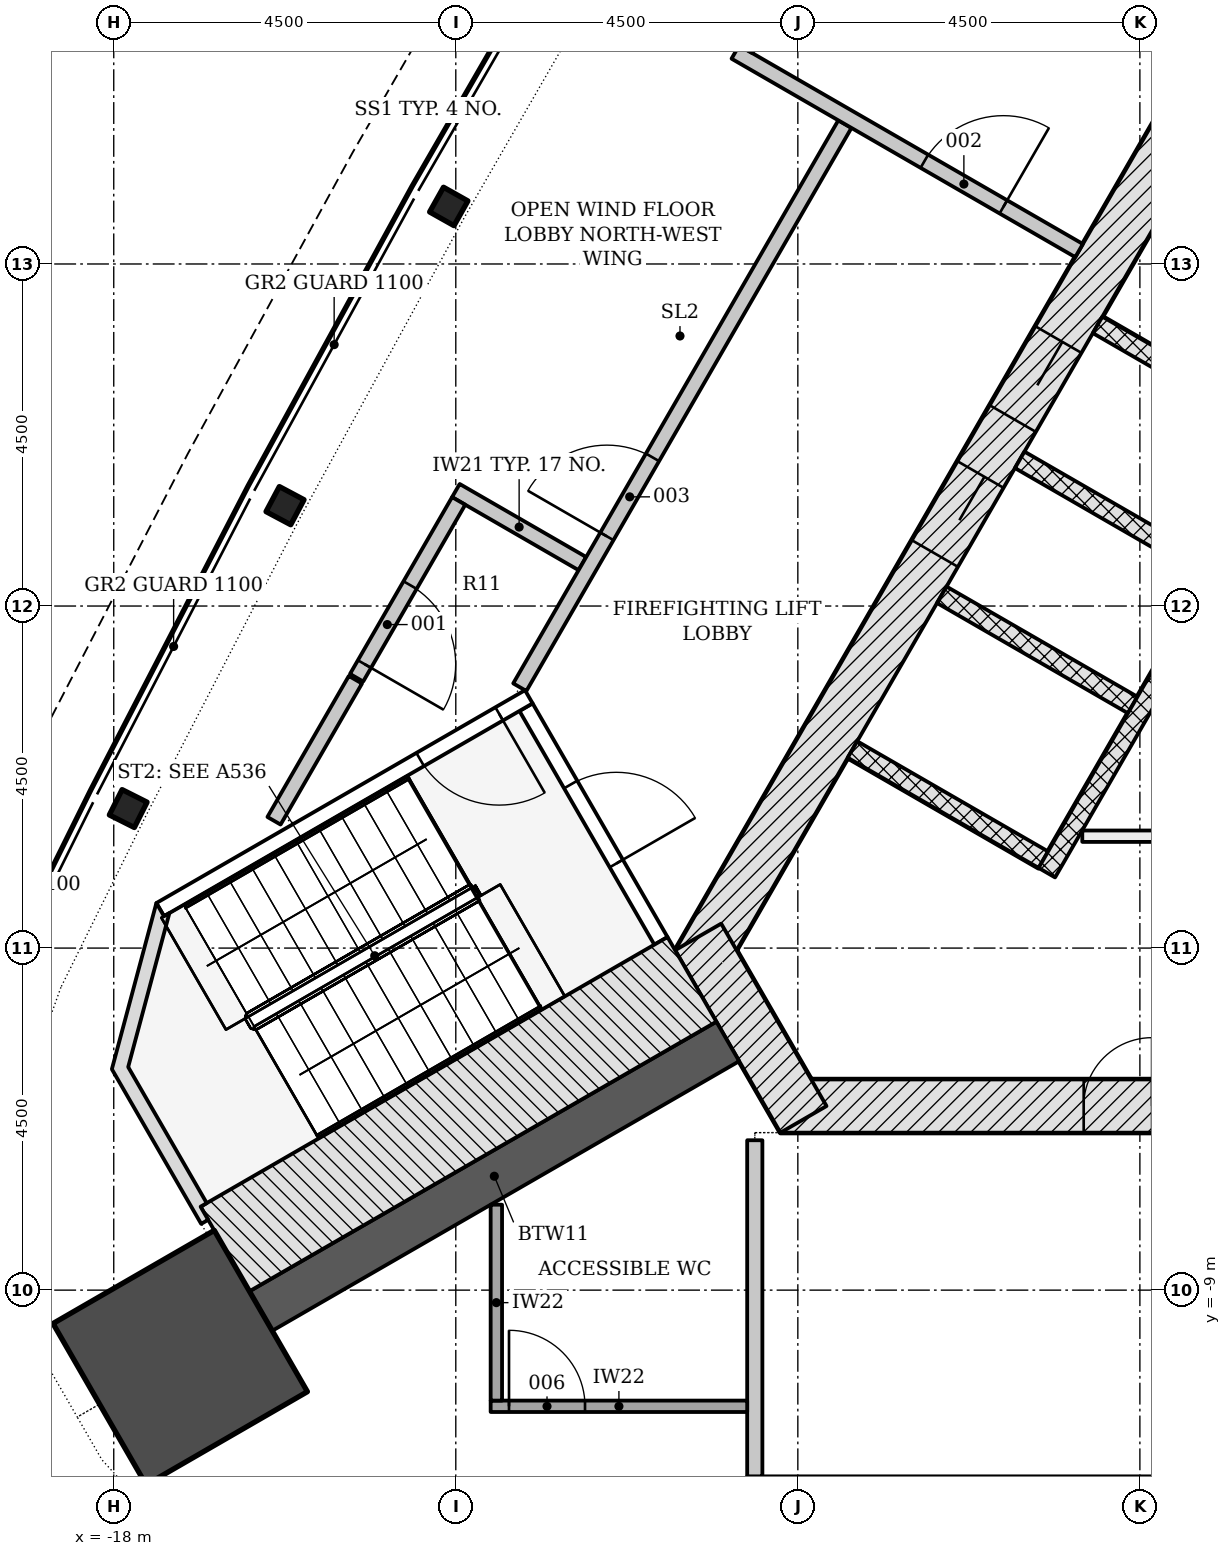
"""IFC4 building model, lengths in metres.
Left out: names, types, materials, properties, quantities, classifications, styles, units other than length and angle.
Written with IfcOpenShell. Run it as: python <this file> out.ifc"""

import sys

from ifc_helpers import new_model, si_unit, direction, frame, frame_2d, origin, origin_2d, place, context, subcontext, project, spatial, polyline, rectangle, i_section, outline, extrude, element, fill, save


model = new_model("IFC4")
c1 = context("Model", 3, precision=1e-05, world=origin(), true_north=direction((0.0, 1.0)))
c2 = subcontext(c1, "Body", "Model", "MODEL_VIEW")
j1 = project(units=[si_unit("LENGTHUNIT", "METRE"), si_unit("PLANEANGLEUNIT", "RADIAN")], contexts=[c1])
p1 = place(None, origin())
s1 = spatial("IfcSite", under=j1, at=p1, CompositionType="ELEMENT")
p2 = place(p1, origin())
s2 = spatial("IfcBuilding", under=s1, at=p2, CompositionType="ELEMENT")
p3 = place(p2, frame((0.0, 0.0, 250.8)))
s3 = spatial("IfcBuildingStorey", under=s2, at=p3, CompositionType="ELEMENT", Elevation=250.8)
p4 = place(p3, frame((-9.229, -6.578, -0.3), z_axis=(0.0, 0.0, 1.0), x_axis=(1.0, 0.0, 0.0)))
e1 = element("IfcWall", 1, at=p4, inside=s3, PredefinedType="SHEAR", context=c2, shape_type="SweptSolid", body=[
    extrude(rectangle(XDim=18.458, YDim=0.7, at=frame_2d((9.229, 0.0))), origin(), (0.0, 0.0, 1.0), 7.2),
])
p5 = place(p4, frame((8.7, 0.0, 0.3)))
e2 = element("IfcOpeningElement", 2, at=p5, cuts=e1, PredefinedType="OPENING", context=c2, shape_type="SweptSolid", body=[
    extrude(rectangle(XDim=1.0, YDim=2.1, at=frame_2d((0.5, 1.05))), frame((0.0, 0.36, 0.0), z_axis=(0.0, -1.0, 0.0), x_axis=(1.0, 0.0, 0.0)), (0.0, 0.0, 1.0), 0.72),
])
p6 = place(p4, frame((3.99, 0.0, 0.3)))
e3 = element("IfcOpeningElement", 3, at=p6, cuts=e1, PredefinedType="OPENING", context=c2, shape_type="SweptSolid", body=[
    extrude(rectangle(XDim=0.9, YDim=2.1, at=frame_2d((0.45, 1.05))), frame((0.0, 0.36, 0.0), z_axis=(0.0, -1.0, 0.0), x_axis=(1.0, 0.0, 0.0)), (0.0, 0.0, 1.0), 0.72),
])
p7 = place(p4, frame((13.539, 0.0, 0.3)))
e4 = element("IfcOpeningElement", 4, at=p7, cuts=e1, PredefinedType="OPENING", context=c2, shape_type="SweptSolid", body=[
    extrude(rectangle(XDim=0.9, YDim=2.1, at=frame_2d((0.45, 1.05))), frame((0.0, 0.36, 0.0), z_axis=(0.0, -1.0, 0.0), x_axis=(1.0, 0.0, 0.0)), (0.0, 0.0, 1.0), 0.72),
])
p8 = place(p3, frame((-1.083, 11.281, -0.3), z_axis=(0.0, 0.0, 1.0), x_axis=(-0.500001446645, -0.866024568562, 0.0)))
e5 = element("IfcWall", 5, at=p8, inside=s3, PredefinedType="SHEAR", context=c2, shape_type="SweptSolid", body=[
    extrude(rectangle(XDim=18.458, YDim=0.7, at=frame_2d((9.229, 0.0))), origin(), (0.0, 0.0, 1.0), 7.2),
])
p9 = place(p8, frame((8.979, 0.0, 0.3)))
e6 = element("IfcOpeningElement", 6, at=p9, cuts=e5, PredefinedType="OPENING", context=c2, shape_type="SweptSolid", body=[
    extrude(rectangle(XDim=1.2, YDim=2.1, at=frame_2d((0.6, 1.05))), frame((0.0, 0.36, 0.0), z_axis=(0.0, -1.0, 0.0), x_axis=(1.0, 0.0, 0.0)), (0.0, 0.0, 1.0), 0.72),
])
p10 = place(p8, frame((11.029, 0.0, 0.3)))
e7 = element("IfcOpeningElement", 7, at=p10, cuts=e5, PredefinedType="OPENING", context=c2, shape_type="SweptSolid", body=[
    extrude(rectangle(XDim=1.2, YDim=2.1, at=frame_2d((0.6, 1.05))), frame((0.0, 0.36, 0.0), z_axis=(0.0, -1.0, 0.0), x_axis=(1.0, 0.0, 0.0)), (0.0, 0.0, 1.0), 0.72),
])
p11 = place(p3, frame((-10.311, -4.353, -0.3), z_axis=(0.0, 0.0, 1.0), x_axis=(0.500042739161, -0.866000726912, 0.0)))
e8 = element("IfcWall", 8, at=p11, inside=s3, PredefinedType="SHEAR", context=c2, shape_type="SweptSolid", body=[
    extrude(rectangle(XDim=2.771, YDim=0.7, at=frame_2d((1.386, 0.0))), origin(), (0.0, 0.0, 1.0), 7.2),
])
p12 = place(p3, frame((-9.922, -5.728, -0.3), z_axis=(0.0, 0.0, 1.0), x_axis=(-0.866029688112, -0.499992579254, 0.0)))
e9 = element("IfcWall", 9, at=p12, inside=s3, PredefinedType="SHEAR", context=c2, shape_type="SweptSolid", body=[
    extrude(rectangle(XDim=7.093, YDim=0.6, at=frame_2d((3.547, 0.0))), origin(), (0.0, 0.0, 1.0), 7.2),
])
p13 = place(p3, frame((-17.126, -9.887, -0.3), z_axis=(0.0, 0.0, 1.0), x_axis=(-0.866025403784, -0.5, 0.0)))
e10 = element("IfcColumn", 10, at=p13, inside=s3, PredefinedType="COLUMN", context=c2, shape_type="SweptSolid", body=[
    extrude(rectangle(XDim=2.45, YDim=2.45, at=origin_2d()), origin(), (0.0, 0.0, 1.0), 7.2),
])
for number, where, z_axis, x_axis in (
    (11, (-13.593, 5.257, -0.3), (0.0, 0.0, 1.0), (-0.49, -0.872, 0.0)),
    (12, (-15.747, 1.32, -0.3), (0.0, 0.0, 1.0), (-0.47, -0.883, 0.0)),
    (13, (-17.81, -2.665, -0.3), (0.0, 0.0, 1.0), (-0.45, -0.893, 0.0)),
):
    element("IfcColumn", number, at=place(p3, frame(where, z_axis=z_axis, x_axis=x_axis)), inside=s3, PredefinedType="COLUMN", context=c2, shape_type="SweptSolid", body=[
        extrude(i_section(OverallWidth=0.373, OverallDepth=0.368, WebThickness=0.015, FlangeThickness=0.024, FilletRadius=0.015, at=origin_2d()), origin(), (0.0, 0.0, 1.0), 7.2),
    ])
for number, where, z_axis, x_axis in (
    (14, (-5.056, 3.699, -0.3), (0.0, 0.0, 1.0), (0.866, -0.5, 0.0)),
    (15, (-6.081, 1.923, -0.3), (0.0, 0.0, 1.0), (0.866, -0.5, 0.0)),
    (16, (-7.106, 0.148, -0.3), (0.0, 0.0, 1.0), (0.866, -0.5, 0.0)),
    (17, (-8.281, -1.887, -0.3), (0.0, 0.0, 1.0), (0.866, -0.5, 0.0)),
):
    element("IfcWall", number, at=place(p3, frame(where, z_axis=z_axis, x_axis=x_axis)), inside=s3, PredefinedType="PARTITIONING", context=c2, shape_type="SweptSolid", body=[
        extrude(rectangle(XDim=2.9, YDim=0.25, at=frame_2d((1.45, 0.0))), origin(), (0.0, 0.0, 1.0), 7.2),
    ])
p14 = place(p3, frame((-2.374, 2.294, 0.0), z_axis=(0.0, 0.0, 1.0), x_axis=(-0.500003174267, -0.866023571113, 0.0)))
e18 = element("IfcWall", 18, at=p14, inside=s3, PredefinedType="PARTITIONING", context=c2, shape_type="SweptSolid", body=[
    extrude(rectangle(XDim=6.7, YDim=0.25, at=frame_2d((3.35, 0.0))), origin(), (0.0, 0.0, 1.0), 6.9),
])
p15 = place(p3, frame((-5.258, -3.028, 0.0), z_axis=(0.0, 0.0, 1.0), x_axis=(1.0, 0.0, 0.0)))
e19 = element("IfcWall", 19, at=p15, inside=s3, PredefinedType="PARTITIONING", context=c2, shape_type="SweptSolid", body=[
    extrude(rectangle(XDim=4.429, YDim=0.15, at=frame_2d((2.215, 0.0))), origin(), (0.0, 0.0, 1.0), 6.9),
])
p16 = place(p3, frame((-12.576, -1.331, -0.3), z_axis=(0.0, 0.0, 1.0), x_axis=(0.499970499736, -0.8660424351, 0.0)))
e20 = element("IfcWall", 20, at=p16, inside=s3, PredefinedType="SHEAR", context=c2, shape_type="SweptSolid", body=[
    extrude(rectangle(XDim=3.55, YDim=0.2, at=frame_2d((1.775, 0.0))), origin(), (0.0, 0.0, 1.0), 7.2),
])
p17 = place(p16, frame((1.175, 0.0, 0.3)))
e21 = element("IfcOpeningElement", 21, at=p17, cuts=e20, PredefinedType="OPENING", context=c2, shape_type="SweptSolid", body=[
    extrude(rectangle(XDim=1.2, YDim=2.1, at=frame_2d((0.6, 1.05))), frame((0.0, 0.11, 0.0), z_axis=(0.0, -1.0, 0.0), x_axis=(1.0, 0.0, 0.0)), (0.0, 0.0, 1.0), 0.22),
])
p18 = place(p3, frame((-12.539, -1.194, -0.3), z_axis=(0.0, 0.0, 1.0), x_axis=(-0.866045472092, -0.499965239061, 0.0)))
e22 = element("IfcWall", 22, at=p18, inside=s3, PredefinedType="SHEAR", context=c2, shape_type="SweptSolid", body=[
    extrude(rectangle(XDim=5.6, YDim=0.2, at=frame_2d((2.8, 0.0))), origin(), (0.0, 0.0, 1.0), 7.2),
])
p19 = place(p18, frame((0.45, 0.0, 0.3)))
e23 = element("IfcOpeningElement", 23, at=p19, cuts=e22, PredefinedType="OPENING", context=c2, shape_type="SweptSolid", body=[
    extrude(rectangle(XDim=1.2, YDim=2.1, at=frame_2d((0.6, 1.05))), frame((0.0, 0.11, 0.0), z_axis=(0.0, -1.0, 0.0), x_axis=(1.0, 0.0, 0.0)), (0.0, 0.0, 1.0), 0.22),
])
p20 = place(p3, frame((-10.393, -4.912, -0.3), z_axis=(0.0, 0.0, 1.0), x_axis=(-0.866023389271, -0.500003489223, 0.0)))
e24 = element("IfcWall", 24, at=p20, inside=s3, PredefinedType="SHEAR", context=c2, shape_type="SweptSolid", body=[
    extrude(rectangle(XDim=7.094, YDim=1.286, at=frame_2d((3.547, 0.0))), origin(), (0.0, 0.0, 1.0), 7.2),
])
p21 = place(p3, frame((0.0, 0.0, -0.3)))
e25 = element("IfcWall", 25, at=p21, inside=s3, PredefinedType="SHEAR", context=c2, shape_type="SweptSolid", body=[
    extrude(outline(polyline([(-17.439, -3.907), (-18.025, -6.093), (-16.85, -8.128), (-16.758, -8.075), (-16.858, -7.902), (-16.858, -7.902), (-16.858, -7.902), (-16.858, -7.902), (-16.858, -7.902), (-16.858, -7.902), (-16.858, -7.902), (-16.858, -7.902), (-16.858, -7.902), (-16.858, -7.902), (-16.858, -7.902), (-16.858, -7.902), (-16.858, -7.902), (-16.858, -7.902), (-16.858, -7.902), (-16.858, -7.902), (-16.858, -7.902), (-16.777, -7.855), (-17.81, -6.065), (-17.267, -4.039), (-17.339, -4.081), (-17.339, -4.081), (-17.339, -4.081), (-17.339, -4.081), (-17.339, -4.081), (-17.339, -4.081), (-17.339, -4.081), (-17.339, -4.081), (-17.339, -4.081), (-17.339, -4.081), (-17.339, -4.081), (-17.339, -4.081), (-17.339, -4.081), (-17.339, -4.081), (-17.339, -4.081), (-17.339, -4.081), (-17.339, -4.081), (-17.439, -3.907)])), origin(), (0.0, 0.0, 1.0), 7.2),
])
p22 = place(p3, frame((-13.499, 1.519, 0.0), z_axis=(0.0, 0.0, 1.0), x_axis=(0.866014224953, -0.500019361804, 0.0)))
e26 = element("IfcWall", 26, at=p22, inside=s3, PredefinedType="PARTITIONING", context=c2, shape_type="SweptSolid", body=[
    extrude(rectangle(XDim=1.922, YDim=0.2, at=frame_2d((0.961, 0.0))), origin(), (0.0, 0.0, 1.0), 6.9),
])
p23 = place(p3, frame((-12.658, -1.068, 0.0), z_axis=(0.0, 0.0, 1.0), x_axis=(0.500000816281, 0.866024932504, 0.0)))
e27 = element("IfcWall", 27, at=p23, inside=s3, PredefinedType="PARTITIONING", context=c2, shape_type="SweptSolid", body=[
    extrude(rectangle(XDim=8.554, YDim=0.2, at=frame_2d((4.277, 0.0))), origin(), (0.0, 0.0, 1.0), 6.352),
])
p24 = place(p23, frame((2.292, 0.0, 0.0)))
e28 = element("IfcOpeningElement", 28, at=p24, cuts=e27, PredefinedType="OPENING", context=c2, shape_type="SweptSolid", body=[
    extrude(rectangle(XDim=1.2, YDim=2.1, at=frame_2d((0.6, 1.05))), frame((0.0, 0.11, 0.0), z_axis=(0.0, -1.0, 0.0), x_axis=(1.0, 0.0, 0.0)), (0.0, 0.0, 1.0), 0.22),
])
p25 = place(p3, frame((-9.822, 7.287, 0.0), z_axis=(0.0, 0.0, 1.0), x_axis=(0.866030647982, -0.499990916673, 0.0)))
e29 = element("IfcWall", 29, at=p25, inside=s3, PredefinedType="PARTITIONING", context=c2, shape_type="SweptSolid", body=[
    extrude(rectangle(XDim=5.222, YDim=0.2, at=frame_2d((2.611, 0.0))), origin(), (0.0, 0.0, 1.0), 6.9),
])
p26 = place(p25, frame((2.872, 0.0, 0.0)))
e30 = element("IfcOpeningElement", 30, at=p26, cuts=e29, PredefinedType="OPENING", context=c2, shape_type="SweptSolid", body=[
    extrude(rectangle(XDim=1.2, YDim=2.1, at=frame_2d((0.6, 1.05))), frame((0.0, 0.11, 0.0), z_axis=(0.0, -1.0, 0.0), x_axis=(1.0, 0.0, 0.0)), (0.0, 0.0, 1.0), 0.22),
])
p27 = place(p3, frame((-13.462, 1.383, 0.0), z_axis=(0.0, 0.0, 1.0), x_axis=(-0.500000452315, -0.86602514264, 0.0)))
e31 = element("IfcWall", 31, at=p27, inside=s3, PredefinedType="PARTITIONING", context=c2, shape_type="SweptSolid", body=[
    extrude(rectangle(XDim=2.686, YDim=0.2, at=frame_2d((1.343, 0.0))), origin(), (0.0, 0.0, 1.0), 6.352),
])
p28 = place(p27, frame((1.278, 0.0, 0.0)))
e32 = element("IfcOpeningElement", 32, at=p28, cuts=e31, PredefinedType="OPENING", context=c2, shape_type="SweptSolid", body=[
    extrude(rectangle(XDim=1.2, YDim=2.1, at=frame_2d((0.6, 1.05))), frame((0.0, 0.11, 0.0), z_axis=(0.0, -1.0, 0.0), x_axis=(1.0, 0.0, 0.0)), (0.0, 0.0, 1.0), 0.22),
])
p29 = place(p3, frame((-14.821, -0.97, 0.0), z_axis=(0.0, 0.0, 1.0), x_axis=(-0.49992632152, -0.866067937896, 0.0)))
e33 = element("IfcWall", 33, at=p29, inside=s3, PredefinedType="PARTITIONING", context=c2, shape_type="SweptSolid", body=[
    extrude(rectangle(XDim=2.142, YDim=0.2, at=frame_2d((1.071, 0.0))), origin(), (0.0, 0.0, 1.0), 6.9),
])
p30 = place(p3, frame((-3.536, 17.976, 0.0), z_axis=(0.0, 0.0, 1.0), x_axis=(-0.499994497941, -0.866028580376, 0.0)))
e34 = element("IfcWall", 34, at=p30, inside=s3, PredefinedType="PARTITIONING", context=c2, shape_type="SweptSolid", body=[
    extrude(rectangle(XDim=12.3, YDim=0.2, at=frame_2d((6.15, 0.0))), origin(), (0.0, 0.0, 1.0), 6.9),
])
p31 = place(p3, frame((-9.667, -11.55, 0.0), z_axis=(0.0, 0.0, 1.0), x_axis=(1.0, 0.0, 0.0)))
e35 = element("IfcWall", 35, at=p31, inside=s3, PredefinedType="PARTITIONING", context=c2, shape_type="SweptSolid", body=[
    extrude(rectangle(XDim=15.0, YDim=0.2, at=frame_2d((7.5, 0.0))), origin(), (0.0, 0.0, 1.0), 6.352),
])
p32 = place(p3, frame((-9.566, -11.45, 0.0), z_axis=(0.0, 0.0, 1.0), x_axis=(0.0, 1.0, 0.0)))
e36 = element("IfcWall", 36, at=p32, inside=s3, PredefinedType="PARTITIONING", context=c2, shape_type="SweptSolid", body=[
    extrude(rectangle(XDim=4.422, YDim=0.2, at=frame_2d((2.211, 0.0))), origin(), (0.0, 0.0, 1.0), 6.9),
])
p33 = place(p3, frame((-13.042, -10.528, 0.0), z_axis=(0.0, 0.0, 1.0), x_axis=(1.0, 0.0, 0.0)))
e37 = element("IfcWall", 37, at=p33, inside=s3, PredefinedType="PARTITIONING", context=c2, shape_type="SweptSolid", body=[
    extrude(rectangle(XDim=3.375, YDim=0.15, at=frame_2d((1.688, 0.0))), origin(), (0.0, 0.0, 1.0), 6.352),
])
p34 = place(p33, frame((0.241, 0.0, 0.0)))
e38 = element("IfcOpeningElement", 38, at=p34, cuts=e37, PredefinedType="OPENING", context=c2, shape_type="SweptSolid", body=[
    extrude(rectangle(XDim=1.0, YDim=2.1, at=frame_2d((0.5, 1.05))), frame((0.0, 0.085, 0.0), z_axis=(0.0, -1.0, 0.0), x_axis=(1.0, 0.0, 0.0)), (0.0, 0.0, 1.0), 0.17),
])
p35 = place(p3, frame((-12.966, -7.876, 0.0), z_axis=(0.0, 0.0, 1.0), x_axis=(0.0, -1.0, 0.0)))
e39 = element("IfcWall", 39, at=p35, inside=s3, PredefinedType="PARTITIONING", context=c2, shape_type="SweptSolid", body=[
    extrude(rectangle(XDim=2.577, YDim=0.15, at=frame_2d((1.289, 0.0))), origin(), (0.0, 0.0, 1.0), 6.9),
])
p36 = place(p9, origin())
e40 = element("IfcDoor", 40, at=p36, inside=s3, OperationType="DOUBLE_DOOR_SLIDING", PredefinedType="DOOR", context=c2, shape_type="SweptSolid", body=[
    extrude(rectangle(XDim=1.2, YDim=2.1, at=frame_2d((0.6, 1.05))), frame((0.0, 0.025, 0.0), z_axis=(0.0, -1.0, 0.0), x_axis=(1.0, 0.0, 0.0)), (0.0, 0.0, 1.0), 0.05),
])
fill(e6, e40)
p37 = place(p10, origin())
e41 = element("IfcDoor", 41, at=p37, inside=s3, OperationType="DOUBLE_DOOR_SLIDING", PredefinedType="DOOR", context=c2, shape_type="SweptSolid", body=[
    extrude(rectangle(XDim=1.2, YDim=2.1, at=frame_2d((0.6, 1.05))), frame((0.0, 0.025, 0.0), z_axis=(0.0, -1.0, 0.0), x_axis=(1.0, 0.0, 0.0)), (0.0, 0.0, 1.0), 0.05),
])
fill(e7, e41)
p38 = place(p6, origin())
e42 = element("IfcDoor", 42, at=p38, inside=s3, OperationType="SINGLE_SWING_RIGHT", PredefinedType="DOOR", context=c2, shape_type="SweptSolid", body=[
    extrude(rectangle(XDim=0.9, YDim=2.1, at=frame_2d((0.45, 1.05))), frame((0.0, 0.075, 0.0), z_axis=(0.0, -1.0, 0.0), x_axis=(1.0, 0.0, 0.0)), (0.0, 0.0, 1.0), 0.15),
])
fill(e3, e42)
p39 = place(p17, origin())
e43 = element("IfcDoor", 43, at=p39, inside=s3, OperationType="SINGLE_SWING_RIGHT", PredefinedType="DOOR", context=c2, shape_type="SweptSolid", body=[
    extrude(rectangle(XDim=1.2, YDim=2.1, at=frame_2d((0.6, 1.05))), frame((0.0, 0.025, 0.0), z_axis=(0.0, -1.0, 0.0), x_axis=(1.0, 0.0, 0.0)), (0.0, 0.0, 1.0), 0.05),
])
fill(e21, e43)
p40 = place(p19, origin())
e44 = element("IfcDoor", 44, at=p40, inside=s3, OperationType="SINGLE_SWING_LEFT", PredefinedType="DOOR", context=c2, shape_type="SweptSolid", body=[
    extrude(rectangle(XDim=1.2, YDim=2.1, at=frame_2d((0.6, 1.05))), frame((0.0, 0.025, 0.0), z_axis=(0.0, -1.0, 0.0), x_axis=(1.0, 0.0, 0.0)), (0.0, 0.0, 1.0), 0.05),
])
fill(e23, e44)
p41 = place(p28, origin())
e45 = element("IfcDoor", 45, at=p41, inside=s3, OperationType="SINGLE_SWING_RIGHT", PredefinedType="DOOR", context=c2, shape_type="SweptSolid", body=[
    extrude(rectangle(XDim=1.2, YDim=2.1, at=frame_2d((0.6, 1.05))), frame((0.0, 0.025, 0.0), z_axis=(0.0, -1.0, 0.0), x_axis=(1.0, 0.0, 0.0)), (0.0, 0.0, 1.0), 0.05),
])
fill(e32, e45)
p42 = place(p26, origin())
e46 = element("IfcDoor", 46, at=p42, inside=s3, OperationType="SINGLE_SWING_RIGHT", PredefinedType="DOOR", context=c2, shape_type="SweptSolid", body=[
    extrude(rectangle(XDim=1.2, YDim=2.1, at=frame_2d((0.6, 1.05))), frame((0.0, 0.025, 0.0), z_axis=(0.0, -1.0, 0.0), x_axis=(1.0, 0.0, 0.0)), (0.0, 0.0, 1.0), 0.05),
])
fill(e30, e46)
p43 = place(p24, origin())
e47 = element("IfcDoor", 47, at=p43, inside=s3, OperationType="SINGLE_SWING_LEFT", PredefinedType="DOOR", context=c2, shape_type="SweptSolid", body=[
    extrude(rectangle(XDim=1.2, YDim=2.1, at=frame_2d((0.6, 1.05))), frame((0.0, 0.025, 0.0), z_axis=(0.0, -1.0, 0.0), x_axis=(1.0, 0.0, 0.0)), (0.0, 0.0, 1.0), 0.05),
])
fill(e28, e47)
p44 = place(p34, origin())
e48 = element("IfcDoor", 48, at=p44, inside=s3, OperationType="SINGLE_SWING_LEFT", PredefinedType="DOOR", context=c2, shape_type="SweptSolid", body=[
    extrude(rectangle(XDim=1.0, YDim=2.1, at=frame_2d((0.5, 1.05))), frame((0.0, 0.025, 0.0), z_axis=(0.0, -1.0, 0.0), x_axis=(1.0, 0.0, 0.0)), (0.0, 0.0, 1.0), 0.05),
])
fill(e38, e48)
save(model, sys.argv[1])
